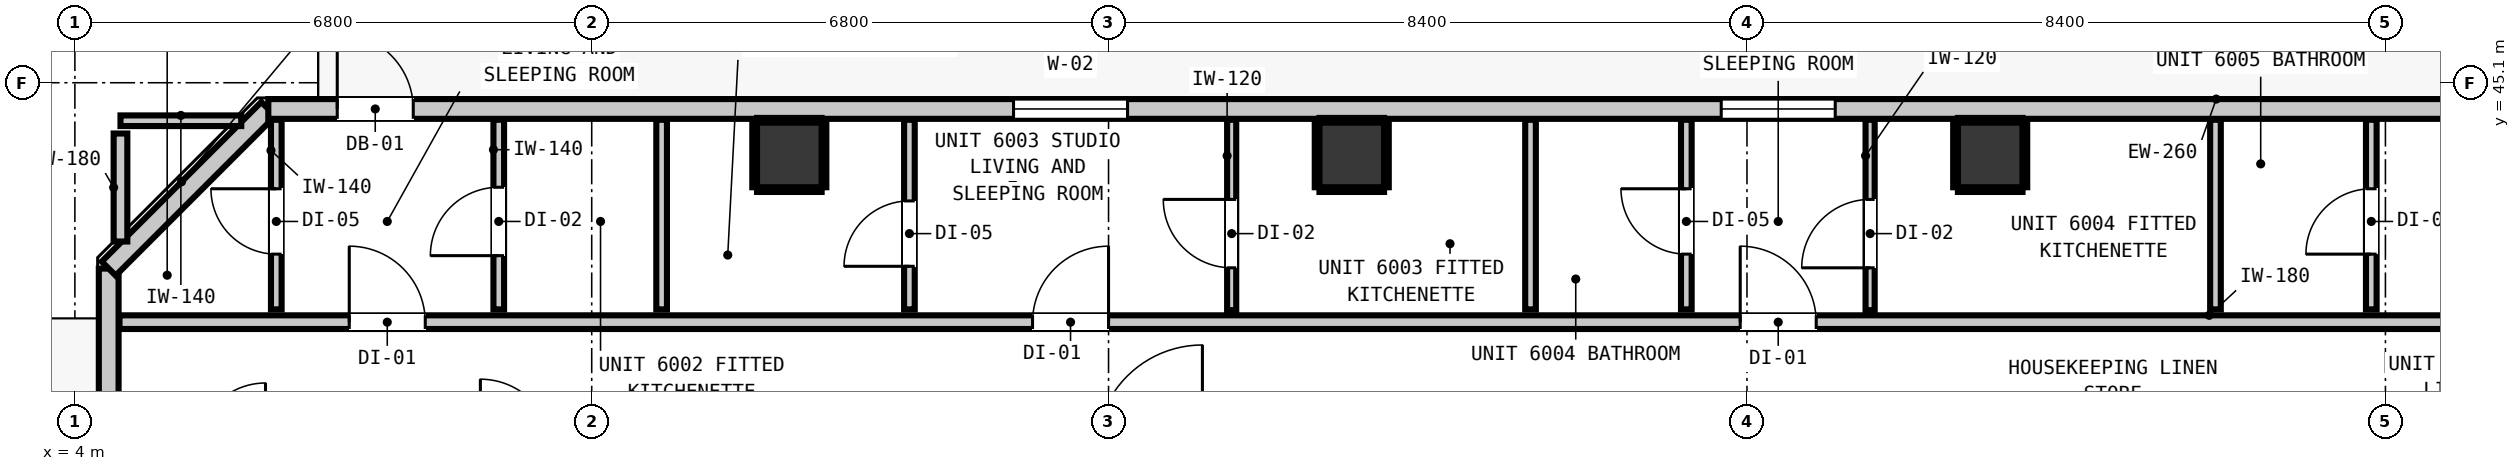
"""IFC4 building model, lengths in metres.
Left out: names, types, materials, properties, quantities, classifications, styles, units other than length and angle.
Written with IfcOpenShell. Run it as: python <this file> out.ifc"""

import sys

from ifc_helpers import new_model, si_unit, direction, frame, frame_2d, origin, origin_2d, place, context, subcontext, project, spatial, rectangle, extrude, element, fill, save


model = new_model("IFC4")
c1 = context("Model", 3, precision=1e-05, world=origin(), true_north=direction((0.0, 1.0)))
c2 = subcontext(c1, "Body", "Model", "MODEL_VIEW")
j1 = project(units=[si_unit("LENGTHUNIT", "METRE"), si_unit("PLANEANGLEUNIT", "RADIAN")], contexts=[c1])
p1 = place(None, origin())
s1 = spatial("IfcSite", under=j1, at=p1, CompositionType="ELEMENT")
p2 = place(p1, origin())
s2 = spatial("IfcBuilding", under=s1, at=p2, CompositionType="ELEMENT")
p3 = place(p2, frame((0.0, 0.0, 206.76)))
s3 = spatial("IfcBuildingStorey", under=s2, at=p3, CompositionType="ELEMENT", Elevation=206.76)
for number, where, z_axis, x_axis in (
    (1, (13.4, 44.15, 0.0), (0.0, 0.0, 1.0), (1.0, 0.0, 0.0)),
    (2, (20.8, 44.15, 0.0), (0.0, 0.0, 1.0), (1.0, 0.0, 0.0)),
    (3, (29.2, 44.15, 0.0), (0.0, 0.0, 1.0), (1.0, 0.0, 0.0)),
):
    element("IfcColumn", number, at=place(p3, frame(where, z_axis=z_axis, x_axis=x_axis)), inside=s3, PredefinedType="COLUMN", context=c2, shape_type="SweptSolid", body=[
        extrude(rectangle(XDim=0.85, YDim=0.85, at=origin_2d()), origin(), (0.0, 0.0, 1.0), 2.9),
    ])
p4 = place(p3, frame((4.445, 12.345, 0.0), z_axis=(0.0, 0.0, 1.0), x_axis=(0.0, 1.0, 0.0)))
e4 = element("IfcWall", 4, at=p4, inside=s3, PredefinedType="STANDARD", context=c2, shape_type="SweptSolid", body=[
    extrude(rectangle(XDim=30.31, YDim=0.26, at=frame_2d((15.155, 0.0))), origin(), (0.0, 0.0, 1.0), 2.9),
])
p5 = place(p4, frame((0.91, 0.0, 0.0)))
e5 = element("IfcOpeningElement", 5, at=p5, cuts=e4, PredefinedType="OPENING", context=c2, shape_type="SweptSolid", body=[
    extrude(rectangle(XDim=1.0, YDim=2.15, at=frame_2d((0.5, 1.075))), frame((0.0, 0.14, 0.0), z_axis=(0.0, -1.0, 0.0), x_axis=(1.0, 0.0, 0.0)), (0.0, 0.0, 1.0), 0.28),
])
p6 = place(p4, frame((2.322, 0.0, 0.85)))
e6 = element("IfcOpeningElement", 6, at=p6, cuts=e4, PredefinedType="OPENING", context=c2, shape_type="SweptSolid", body=[
    extrude(rectangle(XDim=0.58, YDim=1.5, at=frame_2d((0.29, 0.75))), frame((0.0, 0.14, 0.0), z_axis=(0.0, -1.0, 0.0), x_axis=(1.0, 0.0, 0.0)), (0.0, 0.0, 1.0), 0.28),
])
p7 = place(p4, frame((13.255, 0.0, 0.85)))
e7 = element("IfcOpeningElement", 7, at=p7, cuts=e4, PredefinedType="OPENING", context=c2, shape_type="SweptSolid", body=[
    extrude(rectangle(XDim=1.5, YDim=1.8, at=frame_2d((0.75, 0.9))), frame((0.0, 0.14, 0.0), z_axis=(0.0, -1.0, 0.0), x_axis=(1.0, 0.0, 0.0)), (0.0, 0.0, 1.0), 0.28),
])
p8 = place(p3, frame((4.445, 42.655, 0.0), z_axis=(0.0, 0.0, 1.0), x_axis=(0.707106781187, 0.707106781187, 0.0)))
e8 = element("IfcWall", 8, at=p8, inside=s3, PredefinedType="STANDARD", context=c2, shape_type="SweptSolid", body=[
    extrude(rectangle(XDim=2.97, YDim=0.26, at=frame_2d((1.485, 0.0))), origin(), (0.0, 0.0, 1.0), 2.9),
])
p9 = place(p3, frame((6.545, 44.755, 0.0), z_axis=(0.0, 0.0, 1.0), x_axis=(1.0, 0.0, 0.0)))
e9 = element("IfcWall", 9, at=p9, inside=s3, PredefinedType="STANDARD", context=c2, shape_type="SweptSolid", body=[
    extrude(rectangle(XDim=32.71, YDim=0.26, at=frame_2d((16.355, 0.0))), origin(), (0.0, 0.0, 1.0), 2.9),
])
p10 = place(p9, frame((0.907, 0.0, 0.0)))
e10 = element("IfcOpeningElement", 10, at=p10, cuts=e9, PredefinedType="OPENING", context=c2, shape_type="SweptSolid", body=[
    extrude(rectangle(XDim=1.0, YDim=2.15, at=frame_2d((0.5, 1.075))), frame((0.0, 0.14, 0.0), z_axis=(0.0, -1.0, 0.0), x_axis=(1.0, 0.0, 0.0)), (0.0, 0.0, 1.0), 0.28),
])
p11 = place(p9, frame((9.805, 0.0, 0.85)))
e11 = element("IfcOpeningElement", 11, at=p11, cuts=e9, PredefinedType="OPENING", context=c2, shape_type="SweptSolid", body=[
    extrude(rectangle(XDim=1.5, YDim=1.8, at=frame_2d((0.75, 0.9))), frame((0.0, 0.14, 0.0), z_axis=(0.0, -1.0, 0.0), x_axis=(1.0, 0.0, 0.0)), (0.0, 0.0, 1.0), 0.28),
])
p12 = place(p9, frame((19.116, 0.0, 0.85)))
e12 = element("IfcOpeningElement", 12, at=p12, cuts=e9, PredefinedType="OPENING", context=c2, shape_type="SweptSolid", body=[
    extrude(rectangle(XDim=1.5, YDim=1.8, at=frame_2d((0.75, 0.9))), frame((0.0, 0.14, 0.0), z_axis=(0.0, -1.0, 0.0), x_axis=(1.0, 0.0, 0.0)), (0.0, 0.0, 1.0), 0.28),
])
p13 = place(p9, frame((30.642, 0.0, 0.85)))
e13 = element("IfcOpeningElement", 13, at=p13, cuts=e9, PredefinedType="OPENING", context=c2, shape_type="SweptSolid", body=[
    extrude(rectangle(XDim=1.5, YDim=1.8, at=frame_2d((0.75, 0.9))), frame((0.0, 0.14, 0.0), z_axis=(0.0, -1.0, 0.0), x_axis=(1.0, 0.0, 0.0)), (0.0, 0.0, 1.0), 0.28),
])
p14 = place(p3, frame((4.587, 41.95, 0.0), z_axis=(0.0, 0.0, 1.0), x_axis=(1.0, 0.0, 0.0)))
e14 = element("IfcWall", 14, at=p14, inside=s3, PredefinedType="PARTITIONING", context=c2, shape_type="SweptSolid", body=[
    extrude(rectangle(XDim=36.626, YDim=0.18, at=frame_2d((18.313, 0.0))), origin(), (0.0, 0.0, 1.0), 2.9),
])
p15 = place(p14, frame((3.023, 0.0, 0.0)))
e15 = element("IfcOpeningElement", 15, at=p15, cuts=e14, PredefinedType="OPENING", context=c2, shape_type="SweptSolid", body=[
    extrude(rectangle(XDim=1.0, YDim=2.15, at=frame_2d((0.5, 1.075))), frame((0.0, 0.1, 0.0), z_axis=(0.0, -1.0, 0.0), x_axis=(1.0, 0.0, 0.0)), (0.0, 0.0, 1.0), 0.2),
])
p16 = place(p14, frame((12.013, 0.0, 0.0)))
e16 = element("IfcOpeningElement", 16, at=p16, cuts=e14, PredefinedType="OPENING", context=c2, shape_type="SweptSolid", body=[
    extrude(rectangle(XDim=1.0, YDim=2.15, at=frame_2d((0.5, 1.075))), frame((0.0, 0.1, 0.0), z_axis=(0.0, -1.0, 0.0), x_axis=(1.0, 0.0, 0.0)), (0.0, 0.0, 1.0), 0.2),
])
p17 = place(p14, frame((21.324, 0.0, 0.0)))
e17 = element("IfcOpeningElement", 17, at=p17, cuts=e14, PredefinedType="OPENING", context=c2, shape_type="SweptSolid", body=[
    extrude(rectangle(XDim=1.0, YDim=2.15, at=frame_2d((0.5, 1.075))), frame((0.0, 0.1, 0.0), z_axis=(0.0, -1.0, 0.0), x_axis=(1.0, 0.0, 0.0)), (0.0, 0.0, 1.0), 0.2),
])
p18 = place(p14, frame((32.665, 0.0, 0.0)))
e18 = element("IfcOpeningElement", 18, at=p18, cuts=e14, PredefinedType="OPENING", context=c2, shape_type="SweptSolid", body=[
    extrude(rectangle(XDim=1.0, YDim=2.15, at=frame_2d((0.5, 1.075))), frame((0.0, 0.1, 0.0), z_axis=(0.0, -1.0, 0.0), x_axis=(1.0, 0.0, 0.0)), (0.0, 0.0, 1.0), 0.2),
])
p19 = place(p3, frame((4.6, 44.6, 0.0), z_axis=(0.0, 0.0, 1.0), x_axis=(1.0, 0.0, 0.0)))
e19 = element("IfcWall", 19, at=p19, inside=s3, PredefinedType="PARTITIONING", context=c2, shape_type="SweptSolid", body=[
    extrude(rectangle(XDim=1.589, YDim=0.14, at=frame_2d((0.794, 0.0))), origin(), (0.0, 0.0, 1.0), 2.9),
])
p20 = place(p3, frame((4.6, 43.011, 0.0), z_axis=(0.0, 0.0, 1.0), x_axis=(0.0, 1.0, 0.0)))
e20 = element("IfcWall", 20, at=p20, inside=s3, PredefinedType="PARTITIONING", context=c2, shape_type="SweptSolid", body=[
    extrude(rectangle(XDim=1.421, YDim=0.18, at=frame_2d((0.71, 0.0))), origin(), (0.0, 0.0, 1.0), 2.9),
])
p21 = place(p3, frame((6.65, 42.118, 0.0), z_axis=(0.0, 0.0, 1.0), x_axis=(0.0, 1.0, 0.0)))
e21 = element("IfcWall", 21, at=p21, inside=s3, PredefinedType="PARTITIONING", context=c2, shape_type="SweptSolid", body=[
    extrude(rectangle(XDim=2.495, YDim=0.14, at=frame_2d((1.248, 0.0))), origin(), (0.0, 0.0, 1.0), 2.9),
])
p22 = place(p21, frame((0.727, 0.0, 0.0)))
e22 = element("IfcOpeningElement", 22, at=p22, cuts=e21, PredefinedType="OPENING", context=c2, shape_type="SweptSolid", body=[
    extrude(rectangle(XDim=0.86, YDim=2.02, at=frame_2d((0.43, 1.01))), frame((0.0, 0.08, 0.0), z_axis=(0.0, -1.0, 0.0), x_axis=(1.0, 0.0, 0.0)), (0.0, 0.0, 1.0), 0.16),
])
p23 = place(p3, frame((9.577, 42.118, 0.0), z_axis=(0.0, 0.0, 1.0), x_axis=(0.0, 1.0, 0.0)))
e23 = element("IfcWall", 23, at=p23, inside=s3, PredefinedType="PARTITIONING", context=c2, shape_type="SweptSolid", body=[
    extrude(rectangle(XDim=2.495, YDim=0.14, at=frame_2d((1.248, 0.0))), origin(), (0.0, 0.0, 1.0), 2.9),
])
p24 = place(p23, frame((0.707, 0.0, 0.0)))
e24 = element("IfcOpeningElement", 24, at=p24, cuts=e23, PredefinedType="OPENING", context=c2, shape_type="SweptSolid", body=[
    extrude(rectangle(XDim=0.9, YDim=2.1, at=frame_2d((0.45, 1.05))), frame((0.0, 0.08, 0.0), z_axis=(0.0, -1.0, 0.0), x_axis=(1.0, 0.0, 0.0)), (0.0, 0.0, 1.0), 0.16),
])
p25 = place(p3, frame((11.72, 42.118, 0.0), z_axis=(0.0, 0.0, 1.0), x_axis=(0.0, 1.0, 0.0)))
e25 = element("IfcWall", 25, at=p25, inside=s3, PredefinedType="PARTITIONING", context=c2, shape_type="SweptSolid", body=[
    extrude(rectangle(XDim=2.495, YDim=0.14, at=frame_2d((1.248, 0.0))), origin(), (0.0, 0.0, 1.0), 2.9),
])
p26 = place(p3, frame((14.98, 42.118, 0.0), z_axis=(0.0, 0.0, 1.0), x_axis=(0.0, 1.0, 0.0)))
e26 = element("IfcWall", 26, at=p26, inside=s3, PredefinedType="PARTITIONING", context=c2, shape_type="SweptSolid", body=[
    extrude(rectangle(XDim=2.495, YDim=0.14, at=frame_2d((1.248, 0.0))), origin(), (0.0, 0.0, 1.0), 2.9),
])
p27 = place(p26, frame((0.567, 0.0, 0.0)))
e27 = element("IfcOpeningElement", 27, at=p27, cuts=e26, PredefinedType="OPENING", context=c2, shape_type="SweptSolid", body=[
    extrude(rectangle(XDim=0.86, YDim=2.02, at=frame_2d((0.43, 1.01))), frame((0.0, 0.08, 0.0), z_axis=(0.0, -1.0, 0.0), x_axis=(1.0, 0.0, 0.0)), (0.0, 0.0, 1.0), 0.16),
])
p28 = place(p3, frame((23.152, 42.118, 0.0), z_axis=(0.0, 0.0, 1.0), x_axis=(0.0, 1.0, 0.0)))
e28 = element("IfcWall", 28, at=p28, inside=s3, PredefinedType="PARTITIONING", context=c2, shape_type="SweptSolid", body=[
    extrude(rectangle(XDim=2.495, YDim=0.14, at=frame_2d((1.248, 0.0))), origin(), (0.0, 0.0, 1.0), 2.9),
])
p29 = place(p3, frame((25.202, 42.118, 0.0), z_axis=(0.0, 0.0, 1.0), x_axis=(0.0, 1.0, 0.0)))
e29 = element("IfcWall", 29, at=p29, inside=s3, PredefinedType="PARTITIONING", context=c2, shape_type="SweptSolid", body=[
    extrude(rectangle(XDim=2.495, YDim=0.14, at=frame_2d((1.248, 0.0))), origin(), (0.0, 0.0, 1.0), 2.9),
])
p30 = place(p29, frame((0.727, 0.0, 0.0)))
e30 = element("IfcOpeningElement", 30, at=p30, cuts=e29, PredefinedType="OPENING", context=c2, shape_type="SweptSolid", body=[
    extrude(rectangle(XDim=0.86, YDim=2.02, at=frame_2d((0.43, 1.01))), frame((0.0, 0.08, 0.0), z_axis=(0.0, -1.0, 0.0), x_axis=(1.0, 0.0, 0.0)), (0.0, 0.0, 1.0), 0.16),
])
p31 = place(p3, frame((32.164, 42.118, 0.0), z_axis=(0.0, 0.0, 1.0), x_axis=(0.0, 1.0, 0.0)))
e31 = element("IfcWall", 31, at=p31, inside=s3, PredefinedType="PARTITIONING", context=c2, shape_type="SweptSolid", body=[
    extrude(rectangle(XDim=2.495, YDim=0.14, at=frame_2d((1.248, 0.0))), origin(), (0.0, 0.0, 1.0), 2.9),
])
p32 = place(p3, frame((34.214, 42.118, 0.0), z_axis=(0.0, 0.0, 1.0), x_axis=(0.0, 1.0, 0.0)))
e32 = element("IfcWall", 32, at=p32, inside=s3, PredefinedType="PARTITIONING", context=c2, shape_type="SweptSolid", body=[
    extrude(rectangle(XDim=2.495, YDim=0.14, at=frame_2d((1.248, 0.0))), origin(), (0.0, 0.0, 1.0), 2.9),
])
p33 = place(p32, frame((0.727, 0.0, 0.0)))
e33 = element("IfcOpeningElement", 33, at=p33, cuts=e32, PredefinedType="OPENING", context=c2, shape_type="SweptSolid", body=[
    extrude(rectangle(XDim=0.86, YDim=2.02, at=frame_2d((0.43, 1.01))), frame((0.0, 0.08, 0.0), z_axis=(0.0, -1.0, 0.0), x_axis=(1.0, 0.0, 0.0)), (0.0, 0.0, 1.0), 0.16),
])
p34 = place(p3, frame((19.22, 42.108, 0.0), z_axis=(0.0, 0.0, 1.0), x_axis=(0.0, 1.0, 0.0)))
e34 = element("IfcWall", 34, at=p34, inside=s3, PredefinedType="PARTITIONING", context=c2, shape_type="SweptSolid", body=[
    extrude(rectangle(XDim=2.505, YDim=0.12, at=frame_2d((1.252, 0.0))), origin(), (0.0, 0.0, 1.0), 2.9),
])
p35 = place(p34, frame((0.557, 0.0, 0.0)))
e35 = element("IfcOpeningElement", 35, at=p35, cuts=e34, PredefinedType="OPENING", context=c2, shape_type="SweptSolid", body=[
    extrude(rectangle(XDim=0.9, YDim=2.1, at=frame_2d((0.45, 1.05))), frame((0.0, 0.07, 0.0), z_axis=(0.0, -1.0, 0.0), x_axis=(1.0, 0.0, 0.0)), (0.0, 0.0, 1.0), 0.14),
])
p36 = place(p3, frame((27.62, 42.108, 0.0), z_axis=(0.0, 0.0, 1.0), x_axis=(0.0, 1.0, 0.0)))
e36 = element("IfcWall", 36, at=p36, inside=s3, PredefinedType="PARTITIONING", context=c2, shape_type="SweptSolid", body=[
    extrude(rectangle(XDim=2.505, YDim=0.12, at=frame_2d((1.252, 0.0))), origin(), (0.0, 0.0, 1.0), 2.9),
])
p37 = place(p36, frame((0.557, 0.0, 0.0)))
e37 = element("IfcOpeningElement", 37, at=p37, cuts=e36, PredefinedType="OPENING", context=c2, shape_type="SweptSolid", body=[
    extrude(rectangle(XDim=0.9, YDim=2.1, at=frame_2d((0.45, 1.05))), frame((0.0, 0.07, 0.0), z_axis=(0.0, -1.0, 0.0), x_axis=(1.0, 0.0, 0.0)), (0.0, 0.0, 1.0), 0.14),
])
for number, where, z_axis, x_axis in (
    (38, (12.975, 43.693, 0.0), (0.0, 0.0, 1.0), (1.0, 0.0, 0.0)),
    (39, (12.975, 44.607, 0.0), (0.0, 0.0, 1.0), (1.0, 0.0, 0.0)),
):
    element("IfcWall", number, at=place(p3, frame(where, z_axis=z_axis, x_axis=x_axis)), inside=s3, PredefinedType="PARTITIONING", context=c2, shape_type="SweptSolid", body=[
        extrude(rectangle(XDim=0.85, YDim=0.06, at=frame_2d((0.425, 0.0))), origin(), (0.0, 0.0, 1.0), 1.45),
    ])
for number, where, z_axis, x_axis in (
    (40, (12.943, 43.725, 0.0), (0.0, 0.0, 1.0), (0.0, 1.0, 0.0)),
    (41, (13.857, 43.725, 0.0), (0.0, 0.0, 1.0), (0.0, 1.0, 0.0)),
):
    element("IfcWall", number, at=place(p3, frame(where, z_axis=z_axis, x_axis=x_axis)), inside=s3, PredefinedType="PARTITIONING", context=c2, shape_type="SweptSolid", body=[
        extrude(rectangle(XDim=0.85, YDim=0.06, at=frame_2d((0.425, 0.0))), origin(), (0.0, 0.0, 1.0), 0.905),
    ])
for number, where, z_axis, x_axis in (
    (42, (20.375, 43.693, 0.0), (0.0, 0.0, 1.0), (1.0, 0.0, 0.0)),
    (43, (20.375, 44.607, 0.0), (0.0, 0.0, 1.0), (1.0, 0.0, 0.0)),
):
    element("IfcWall", number, at=place(p3, frame(where, z_axis=z_axis, x_axis=x_axis)), inside=s3, PredefinedType="PARTITIONING", context=c2, shape_type="SweptSolid", body=[
        extrude(rectangle(XDim=0.85, YDim=0.06, at=frame_2d((0.425, 0.0))), origin(), (0.0, 0.0, 1.0), 1.45),
    ])
for number, where, z_axis, x_axis in (
    (44, (20.343, 43.725, 0.0), (0.0, 0.0, 1.0), (0.0, 1.0, 0.0)),
    (45, (21.257, 43.725, 0.0), (0.0, 0.0, 1.0), (0.0, 1.0, 0.0)),
):
    element("IfcWall", number, at=place(p3, frame(where, z_axis=z_axis, x_axis=x_axis)), inside=s3, PredefinedType="PARTITIONING", context=c2, shape_type="SweptSolid", body=[
        extrude(rectangle(XDim=0.85, YDim=0.06, at=frame_2d((0.425, 0.0))), origin(), (0.0, 0.0, 1.0), 0.905),
    ])
for number, where, z_axis, x_axis in (
    (46, (28.775, 43.693, 0.0), (0.0, 0.0, 1.0), (1.0, 0.0, 0.0)),
    (47, (28.775, 44.607, 0.0), (0.0, 0.0, 1.0), (1.0, 0.0, 0.0)),
):
    element("IfcWall", number, at=place(p3, frame(where, z_axis=z_axis, x_axis=x_axis)), inside=s3, PredefinedType="PARTITIONING", context=c2, shape_type="SweptSolid", body=[
        extrude(rectangle(XDim=0.85, YDim=0.06, at=frame_2d((0.425, 0.0))), origin(), (0.0, 0.0, 1.0), 1.45),
    ])
for number, where, z_axis, x_axis in (
    (48, (28.743, 43.725, 0.0), (0.0, 0.0, 1.0), (0.0, 1.0, 0.0)),
    (49, (29.657, 43.725, 0.0), (0.0, 0.0, 1.0), (0.0, 1.0, 0.0)),
):
    element("IfcWall", number, at=place(p3, frame(where, z_axis=z_axis, x_axis=x_axis)), inside=s3, PredefinedType="PARTITIONING", context=c2, shape_type="SweptSolid", body=[
        extrude(rectangle(XDim=0.85, YDim=0.06, at=frame_2d((0.425, 0.0))), origin(), (0.0, 0.0, 1.0), 0.905),
    ])
p38 = place(p10, origin())
e50 = element("IfcDoor", 50, at=p38, inside=s3, OperationType="SINGLE_SWING_LEFT", PredefinedType="DOOR", context=c2, shape_type="SweptSolid", body=[
    extrude(rectangle(XDim=1.0, YDim=2.15, at=frame_2d((0.5, 1.075))), frame((0.0, 0.025, 0.0), z_axis=(0.0, -1.0, 0.0), x_axis=(1.0, 0.0, 0.0)), (0.0, 0.0, 1.0), 0.05),
])
fill(e10, e50)
p39 = place(p11, origin())
e51 = element("IfcWindow", 51, at=p39, inside=s3, PartitioningType="SINGLE_PANEL", PredefinedType="WINDOW", context=c2, shape_type="SweptSolid", body=[
    extrude(rectangle(XDim=1.5, YDim=1.8, at=frame_2d((0.75, 0.9))), frame((0.0, 0.03, 0.0), z_axis=(0.0, -1.0, 0.0), x_axis=(1.0, 0.0, 0.0)), (0.0, 0.0, 1.0), 0.06),
])
fill(e11, e51)
p40 = place(p12, origin())
e52 = element("IfcWindow", 52, at=p40, inside=s3, PartitioningType="SINGLE_PANEL", PredefinedType="WINDOW", context=c2, shape_type="SweptSolid", body=[
    extrude(rectangle(XDim=1.5, YDim=1.8, at=frame_2d((0.75, 0.9))), frame((0.0, 0.03, 0.0), z_axis=(0.0, -1.0, 0.0), x_axis=(1.0, 0.0, 0.0)), (0.0, 0.0, 1.0), 0.06),
])
fill(e12, e52)
p41 = place(p15, origin())
e53 = element("IfcDoor", 53, at=p41, inside=s3, OperationType="SINGLE_SWING_LEFT", PredefinedType="DOOR", context=c2, shape_type="SweptSolid", body=[
    extrude(rectangle(XDim=1.0, YDim=2.15, at=frame_2d((0.5, 1.075))), frame((0.0, 0.025, 0.0), z_axis=(0.0, -1.0, 0.0), x_axis=(1.0, 0.0, 0.0)), (0.0, 0.0, 1.0), 0.05),
])
fill(e15, e53)
p42 = place(p22, origin())
e54 = element("IfcDoor", 54, at=p42, inside=s3, OperationType="SINGLE_SWING_RIGHT", PredefinedType="DOOR", context=c2, shape_type="SweptSolid", body=[
    extrude(rectangle(XDim=0.86, YDim=2.02, at=frame_2d((0.43, 1.01))), frame((0.0, 0.025, 0.0), z_axis=(0.0, -1.0, 0.0), x_axis=(1.0, 0.0, 0.0)), (0.0, 0.0, 1.0), 0.05),
])
fill(e22, e54)
p43 = place(p24, origin())
e55 = element("IfcDoor", 55, at=p43, inside=s3, OperationType="SINGLE_SWING_LEFT", PredefinedType="DOOR", context=c2, shape_type="SweptSolid", body=[
    extrude(rectangle(XDim=0.9, YDim=2.1, at=frame_2d((0.45, 1.05))), frame((0.0, 0.025, 0.0), z_axis=(0.0, -1.0, 0.0), x_axis=(1.0, 0.0, 0.0)), (0.0, 0.0, 1.0), 0.05),
])
fill(e24, e55)
p44 = place(p16, origin())
e56 = element("IfcDoor", 56, at=p44, inside=s3, OperationType="SINGLE_SWING_RIGHT", PredefinedType="DOOR", context=c2, shape_type="SweptSolid", body=[
    extrude(rectangle(XDim=1.0, YDim=2.15, at=frame_2d((0.5, 1.075))), frame((0.0, 0.025, 0.0), z_axis=(0.0, -1.0, 0.0), x_axis=(1.0, 0.0, 0.0)), (0.0, 0.0, 1.0), 0.05),
])
fill(e16, e56)
p45 = place(p27, origin())
e57 = element("IfcDoor", 57, at=p45, inside=s3, OperationType="SINGLE_SWING_LEFT", PredefinedType="DOOR", context=c2, shape_type="SweptSolid", body=[
    extrude(rectangle(XDim=0.86, YDim=2.02, at=frame_2d((0.43, 1.01))), frame((0.0, 0.025, 0.0), z_axis=(0.0, -1.0, 0.0), x_axis=(1.0, 0.0, 0.0)), (0.0, 0.0, 1.0), 0.05),
])
fill(e27, e57)
p46 = place(p35, origin())
e58 = element("IfcDoor", 58, at=p46, inside=s3, OperationType="SINGLE_SWING_RIGHT", PredefinedType="DOOR", context=c2, shape_type="SweptSolid", body=[
    extrude(rectangle(XDim=0.9, YDim=2.1, at=frame_2d((0.45, 1.05))), frame((0.0, 0.025, 0.0), z_axis=(0.0, -1.0, 0.0), x_axis=(1.0, 0.0, 0.0)), (0.0, 0.0, 1.0), 0.05),
])
fill(e35, e58)
p47 = place(p17, origin())
e59 = element("IfcDoor", 59, at=p47, inside=s3, OperationType="SINGLE_SWING_LEFT", PredefinedType="DOOR", context=c2, shape_type="SweptSolid", body=[
    extrude(rectangle(XDim=1.0, YDim=2.15, at=frame_2d((0.5, 1.075))), frame((0.0, 0.025, 0.0), z_axis=(0.0, -1.0, 0.0), x_axis=(1.0, 0.0, 0.0)), (0.0, 0.0, 1.0), 0.05),
])
fill(e17, e59)
p48 = place(p30, origin())
e60 = element("IfcDoor", 60, at=p48, inside=s3, OperationType="SINGLE_SWING_RIGHT", PredefinedType="DOOR", context=c2, shape_type="SweptSolid", body=[
    extrude(rectangle(XDim=0.86, YDim=2.02, at=frame_2d((0.43, 1.01))), frame((0.0, 0.025, 0.0), z_axis=(0.0, -1.0, 0.0), x_axis=(1.0, 0.0, 0.0)), (0.0, 0.0, 1.0), 0.05),
])
fill(e30, e60)
p49 = place(p37, origin())
e61 = element("IfcDoor", 61, at=p49, inside=s3, OperationType="SINGLE_SWING_LEFT", PredefinedType="DOOR", context=c2, shape_type="SweptSolid", body=[
    extrude(rectangle(XDim=0.9, YDim=2.1, at=frame_2d((0.45, 1.05))), frame((0.0, 0.025, 0.0), z_axis=(0.0, -1.0, 0.0), x_axis=(1.0, 0.0, 0.0)), (0.0, 0.0, 1.0), 0.05),
])
fill(e37, e61)
p50 = place(p33, origin())
e62 = element("IfcDoor", 62, at=p50, inside=s3, OperationType="SINGLE_SWING_LEFT", PredefinedType="DOOR", context=c2, shape_type="SweptSolid", body=[
    extrude(rectangle(XDim=0.86, YDim=2.02, at=frame_2d((0.43, 1.01))), frame((0.0, 0.025, 0.0), z_axis=(0.0, -1.0, 0.0), x_axis=(1.0, 0.0, 0.0)), (0.0, 0.0, 1.0), 0.05),
])
fill(e33, e62)
save(model, sys.argv[1])
